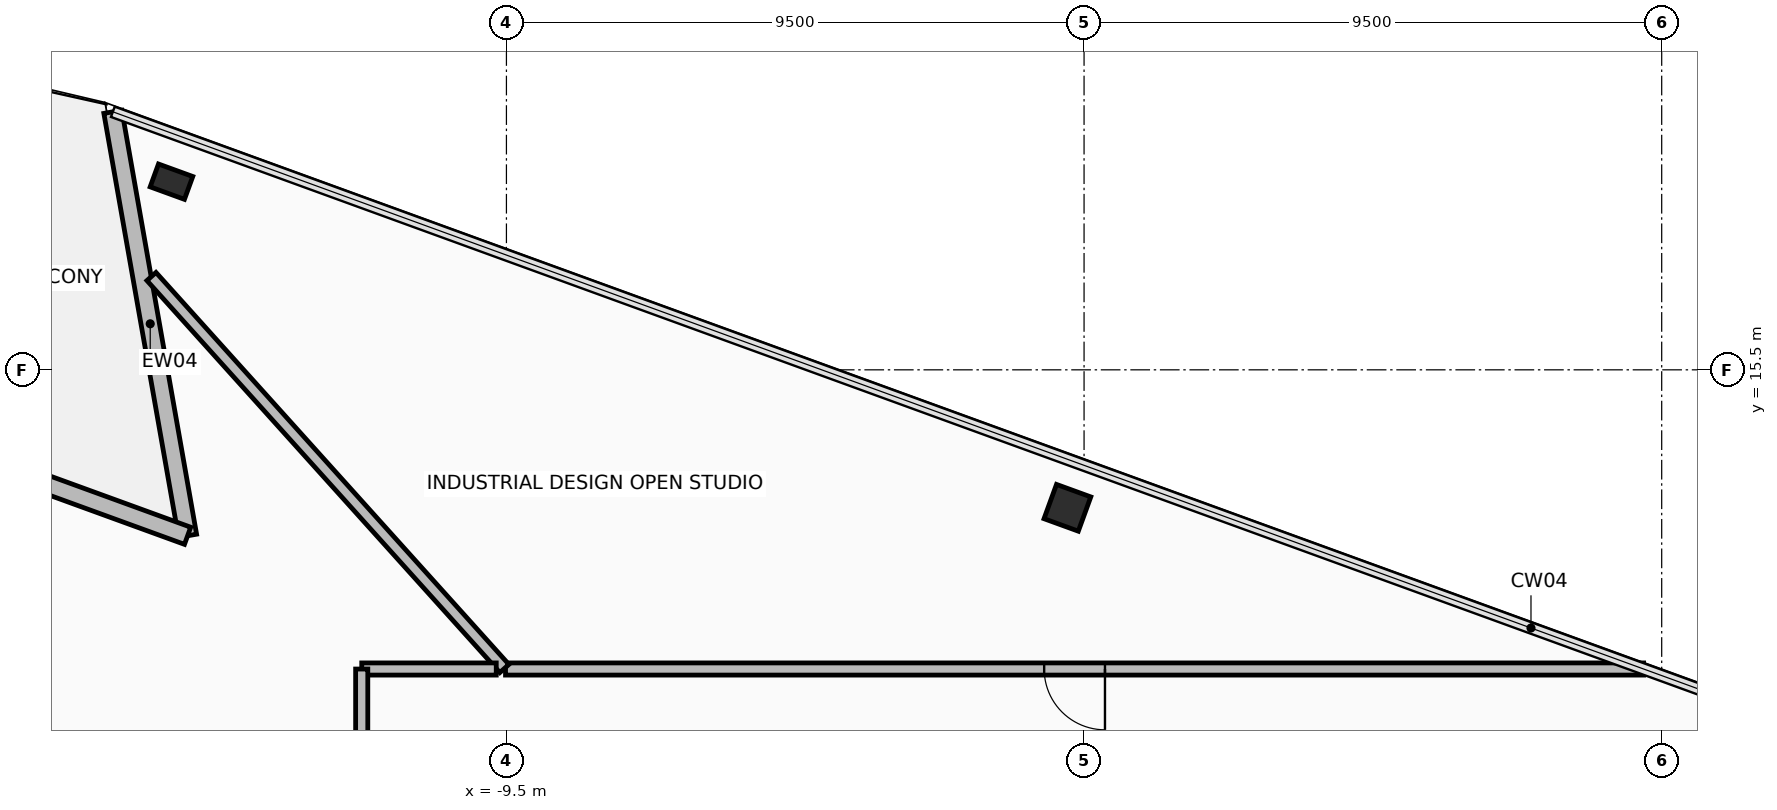
"""IFC4 building model, lengths in metres.
Left out: names, types, materials, properties, quantities, classifications, styles, units other than length and angle.
Written with IfcOpenShell. Run it as: python <this file> out.ifc"""

import sys

from ifc_helpers import new_model, si_unit, direction, frame, frame_2d, origin, origin_2d, place, context, subcontext, project, spatial, rectangle, hollow_rectangle, extrude, element, fill, save


model = new_model("IFC4")
c1 = context("Model", 3, precision=1e-05, world=origin(), true_north=direction((0.0, 1.0)))
c2 = subcontext(c1, "Body", "Model", "MODEL_VIEW")
j1 = project(units=[si_unit("LENGTHUNIT", "METRE"), si_unit("PLANEANGLEUNIT", "RADIAN")], contexts=[c1])
p1 = place(None, origin())
s1 = spatial("IfcSite", under=j1, at=p1, CompositionType="ELEMENT")
p2 = place(p1, origin())
s2 = spatial("IfcBuilding", under=s1, at=p2, CompositionType="ELEMENT")
p3 = place(p2, frame((0.0, 0.0, 192.1)))
s3 = spatial("IfcBuildingStorey", under=s2, at=p3, CompositionType="ELEMENT", Elevation=192.1)
p4 = place(p3, frame((-0.274, 13.231, 0.0), z_axis=(0.0, 0.0, 1.0), x_axis=(-0.939692023847, 0.342021783398, 0.0)))
e1 = element("IfcColumn", 1, at=p4, inside=s3, PredefinedType="COLUMN", context=c2, shape_type="SweptSolid", body=[
    extrude(hollow_rectangle(XDim=0.6, YDim=0.6, WallThickness=0.036, at=origin_2d()), origin(), (0.0, 0.0, 1.0), 4.75),
])
p5 = place(p3, frame((-15.009, 18.594, 0.0), z_axis=(0.0, 0.0, 1.0), x_axis=(-0.939692023847, 0.342021783398, 0.0)))
e2 = element("IfcColumn", 2, at=p5, inside=s3, PredefinedType="COLUMN", context=c2, shape_type="SweptSolid", body=[
    extrude(hollow_rectangle(XDim=0.4, YDim=0.6, WallThickness=0.03, at=origin_2d()), origin(), (0.0, 0.0, 1.0), 4.75),
])
p6 = place(p3, frame((-15.973, 19.743, 0.0), z_axis=(0.0, 0.0, 1.0), x_axis=(0.173651569749, -0.984807154891, 0.0)))
e3 = element("IfcWall", 3, at=p6, inside=s3, PredefinedType="STANDARD", context=c2, shape_type="SweptSolid", body=[
    extrude(rectangle(XDim=7.08, YDim=0.3, at=frame_2d((3.54, 0.0))), origin(), (0.0, 0.0, 1.0), 2.255),
])
p7 = place(p3, frame((-14.744, 12.771, 0.0), z_axis=(0.0, 0.0, 1.0), x_axis=(-0.939687665182, 0.342033758429, 0.0)))
e4 = element("IfcWall", 4, at=p7, inside=s3, PredefinedType="STANDARD", context=c2, shape_type="SweptSolid", body=[
    extrude(rectangle(XDim=7.08, YDim=0.3, at=frame_2d((3.54, 0.0))), origin(), (0.0, 0.0, 1.0), 2.255),
])
p8 = place(p7, frame((2.608, 0.0, 0.0)))
e5 = element("IfcOpeningElement", 5, at=p8, cuts=e4, PredefinedType="OPENING", context=c2, shape_type="SweptSolid", body=[
    extrude(rectangle(XDim=1.1, YDim=2.2, at=frame_2d((0.55, 1.1))), frame((0.0, 0.16, 0.0), z_axis=(0.0, -1.0, 0.0), x_axis=(1.0, 0.0, 0.0)), (0.0, 0.0, 1.0), 0.32),
])
p9 = place(p3, frame((9.203, 10.58, 0.0), z_axis=(0.0, 0.0, 1.0), x_axis=(-1.0, 0.0, 0.0)))
e6 = element("IfcWall", 6, at=p9, inside=s3, PredefinedType="PARTITIONING", context=c2, shape_type="SweptSolid", body=[
    extrude(rectangle(XDim=18.718, YDim=0.2, at=frame_2d((9.359, 0.0))), origin(), (0.0, 0.0, 1.0), 2.255),
])
p10 = place(p9, frame((8.859, 0.0, 0.0)))
e7 = element("IfcOpeningElement", 7, at=p10, cuts=e6, PredefinedType="OPENING", context=c2, shape_type="SweptSolid", body=[
    extrude(rectangle(XDim=1.0, YDim=2.15, at=frame_2d((0.5, 1.075))), frame((0.0, 0.11, 0.0), z_axis=(0.0, -1.0, 0.0), x_axis=(1.0, 0.0, 0.0)), (0.0, 0.0, 1.0), 0.22),
])
p11 = place(p3, frame((-9.534, 10.588, 0.0), z_axis=(0.0, 0.0, 1.0), x_axis=(-0.66914197802, 0.743134586231, 0.0)))
e8 = element("IfcWall", 8, at=p11, inside=s3, PredefinedType="PARTITIONING", context=c2, shape_type="SweptSolid", body=[
    extrude(rectangle(XDim=8.675, YDim=0.2, at=frame_2d((4.337, 0.0))), origin(), (0.0, 0.0, 1.0), 2.755),
])
p12 = place(p3, frame((-9.667, 10.58, 0.0), z_axis=(0.0, 0.0, 1.0), x_axis=(-1.0, 0.0, 0.0)))
e9 = element("IfcWall", 9, at=p12, inside=s3, PredefinedType="PARTITIONING", context=c2, shape_type="SweptSolid", body=[
    extrude(rectangle(XDim=2.212, YDim=0.2, at=frame_2d((1.106, 0.0))), origin(), (0.0, 0.0, 1.0), 2.755),
])
p13 = place(p3, frame((-11.88, 10.579, 0.0), z_axis=(0.0, 0.0, 1.0), x_axis=(0.0, -1.0, 0.0)))
e10 = element("IfcWall", 10, at=p13, inside=s3, PredefinedType="PARTITIONING", context=c2, shape_type="SweptSolid", body=[
    extrude(rectangle(XDim=17.471, YDim=0.2, at=frame_2d((8.735, 0.0))), origin(), (0.0, 0.0, 1.0), 2.755),
])
p14 = place(p13, frame((8.135, 0.0, 0.0)))
e11 = element("IfcOpeningElement", 11, at=p14, cuts=e10, PredefinedType="OPENING", context=c2, shape_type="SweptSolid", body=[
    extrude(rectangle(XDim=1.2, YDim=2.15, at=frame_2d((0.6, 1.075))), frame((0.0, 0.11, 0.0), z_axis=(0.0, -1.0, 0.0), x_axis=(1.0, 0.0, 0.0)), (0.0, 0.0, 1.0), 0.22),
])
p15 = place(p10, origin())
e12 = element("IfcDoor", 12, at=p15, inside=s3, OperationType="SINGLE_SWING_RIGHT", PredefinedType="DOOR", context=c2, shape_type="SweptSolid", body=[
    extrude(rectangle(XDim=1.0, YDim=2.15, at=frame_2d((0.5, 1.075))), frame((0.0, 0.025, 0.0), z_axis=(0.0, -1.0, 0.0), x_axis=(1.0, 0.0, 0.0)), (0.0, 0.0, 1.0), 0.05),
])
fill(e7, e12)
save(model, sys.argv[1])
